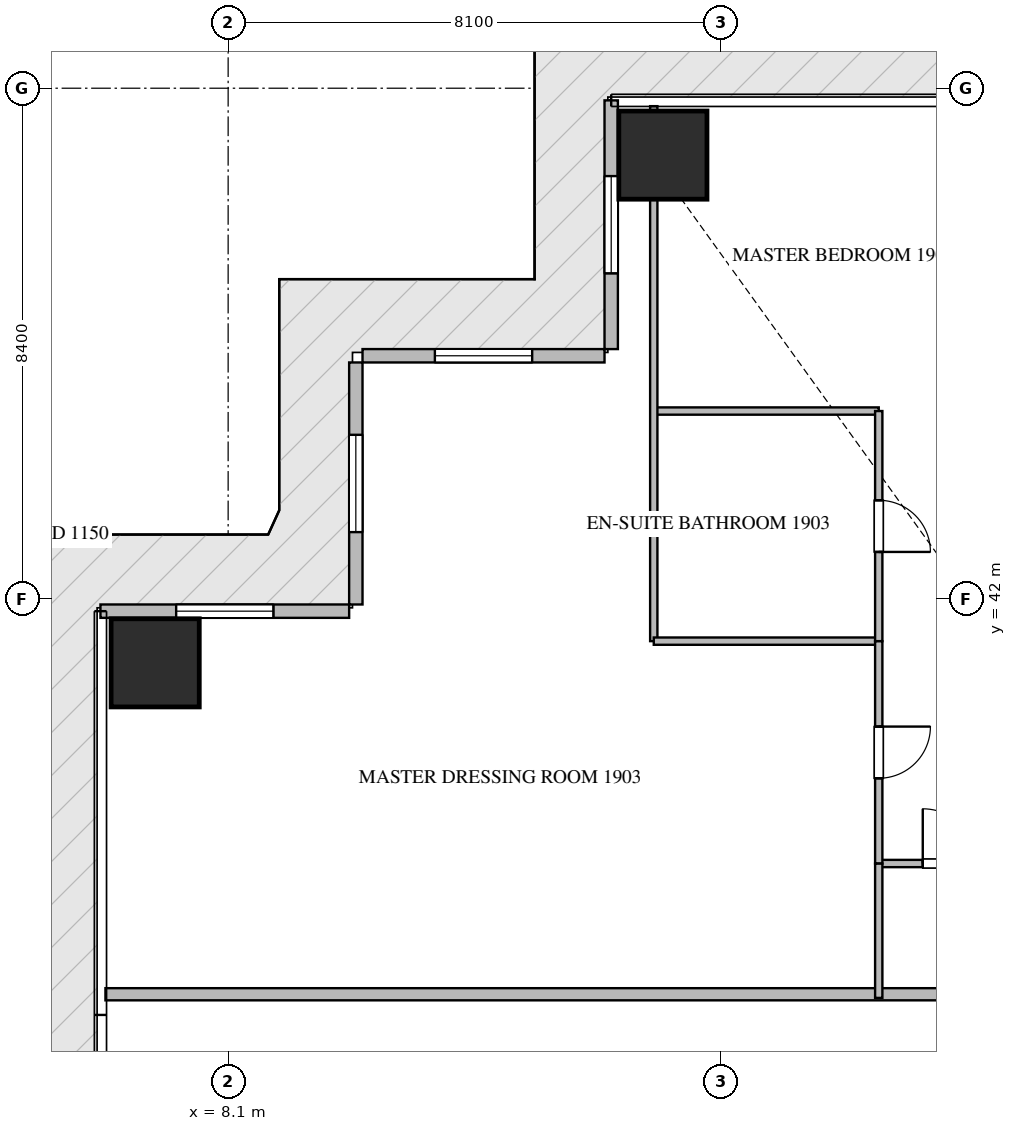
"""IFC4 building model, lengths in metres.
Left out: names, types, materials, properties, quantities, classifications, styles, units other than length and angle.
Written with IfcOpenShell. Run it as: python <this file> out.ifc"""

import sys

from ifc_helpers import new_model, si_unit, direction, frame, frame_2d, origin, origin_2d, place, context, subcontext, project, spatial, rectangle, extrude, source, transform, mapped, element, fill, save


model = new_model("IFC4")
c1 = context("Model", 3, precision=1e-05, world=origin(), true_north=direction((0.0, 1.0)))
c2 = subcontext(c1, "Body", "Model", "MODEL_VIEW")
j1 = project(units=[si_unit("LENGTHUNIT", "METRE"), si_unit("PLANEANGLEUNIT", "RADIAN")], contexts=[c1])
p1 = place(None, origin())
s1 = spatial("IfcSite", under=j1, at=p1, CompositionType="ELEMENT")
p2 = place(p1, origin())
s2 = spatial("IfcBuilding", under=s1, at=p2, CompositionType="ELEMENT")
p3 = place(p2, frame((0.0, 0.0, 79.2)))
s3 = spatial("IfcBuildingStorey", under=s2, at=p3, CompositionType="ELEMENT", Elevation=79.2)
m1 = source(origin(), c2, "Body", "SweptSolid", [
    extrude(rectangle(XDim=1.45, YDim=1.45, at=origin_2d()), origin(), (0.0, 0.0, 1.0), 3.75),
])
for number, where, z_axis, x_axis in (
    (1, (15.25, 49.3, -0.26), (0.0, 0.0, 1.0), (1.0, 0.0, 0.0)),
    (2, (6.9, 40.95, -0.26), (0.0, 0.0, 1.0), (1.0, 0.0, 0.0)),
):
    element("IfcColumn", number, at=place(p3, frame(where, z_axis=z_axis, x_axis=x_axis)), inside=s3, PredefinedType="COLUMN", context=c2, shape_type="MappedRepresentation", body=[
        mapped(m1, transform((0.0, 0.0, 0.0), scale=1.0)),
    ])
p4 = place(p3, frame((14.4, 50.2, 0.0), z_axis=(0.0, 0.0, 1.0), x_axis=(0.0, -1.0, 0.0)))
e3 = element("IfcWall", 3, at=p4, inside=s3, PredefinedType="ELEMENTEDWALL", context=c2, shape_type="SweptSolid", body=[
    extrude(rectangle(XDim=4.09, YDim=0.22, at=frame_2d((2.045, 0.0))), origin(), (0.0, 0.0, 1.0), 3.475),
])
p5 = place(p4, frame((1.245, 0.0, 0.65)))
e4 = element("IfcOpeningElement", 4, at=p5, cuts=e3, PredefinedType="OPENING", context=c2, shape_type="SweptSolid", body=[
    extrude(rectangle(XDim=1.6, YDim=2.1, at=frame_2d((0.8, 1.05))), frame((0.0, 0.12, 0.0), z_axis=(0.0, -1.0, 0.0), x_axis=(1.0, 0.0, 0.0)), (0.0, 0.0, 1.0), 0.24),
])
p6 = place(p3, frame((14.29, 46.0, 0.0), z_axis=(0.0, 0.0, 1.0), x_axis=(-1.0, 0.0, 0.0)))
e5 = element("IfcWall", 5, at=p6, inside=s3, PredefinedType="ELEMENTEDWALL", context=c2, shape_type="SweptSolid", body=[
    extrude(rectangle(XDim=3.98, YDim=0.22, at=frame_2d((1.99, 0.0))), origin(), (0.0, 0.0, 1.0), 3.475),
])
p7 = place(p6, frame((1.19, 0.0, 0.65)))
e6 = element("IfcOpeningElement", 6, at=p7, cuts=e5, PredefinedType="OPENING", context=c2, shape_type="SweptSolid", body=[
    extrude(rectangle(XDim=1.6, YDim=2.1, at=frame_2d((0.8, 1.05))), frame((0.0, 0.12, 0.0), z_axis=(0.0, -1.0, 0.0), x_axis=(1.0, 0.0, 0.0)), (0.0, 0.0, 1.0), 0.24),
])
p8 = place(p3, frame((10.2, 45.89, 0.0), z_axis=(0.0, 0.0, 1.0), x_axis=(0.0, -1.0, 0.0)))
e7 = element("IfcWall", 7, at=p8, inside=s3, PredefinedType="ELEMENTEDWALL", context=c2, shape_type="SweptSolid", body=[
    extrude(rectangle(XDim=3.98, YDim=0.22, at=frame_2d((1.99, 0.0))), origin(), (0.0, 0.0, 1.0), 3.475),
])
p9 = place(p8, frame((1.19, 0.0, 0.65)))
e8 = element("IfcOpeningElement", 8, at=p9, cuts=e7, PredefinedType="OPENING", context=c2, shape_type="SweptSolid", body=[
    extrude(rectangle(XDim=1.6, YDim=2.1, at=frame_2d((0.8, 1.05))), frame((0.0, 0.12, 0.0), z_axis=(0.0, -1.0, 0.0), x_axis=(1.0, 0.0, 0.0)), (0.0, 0.0, 1.0), 0.24),
])
p10 = place(p3, frame((10.09, 41.8, 0.0), z_axis=(0.0, 0.0, 1.0), x_axis=(-1.0, 0.0, 0.0)))
e9 = element("IfcWall", 9, at=p10, inside=s3, PredefinedType="ELEMENTEDWALL", context=c2, shape_type="SweptSolid", body=[
    extrude(rectangle(XDim=4.09, YDim=0.22, at=frame_2d((2.045, 0.0))), origin(), (0.0, 0.0, 1.0), 3.475),
])
p11 = place(p10, frame((1.245, 0.0, 0.65)))
e10 = element("IfcOpeningElement", 10, at=p11, cuts=e9, PredefinedType="OPENING", context=c2, shape_type="SweptSolid", body=[
    extrude(rectangle(XDim=1.6, YDim=2.1, at=frame_2d((0.8, 1.05))), frame((0.0, 0.12, 0.0), z_axis=(0.0, -1.0, 0.0), x_axis=(1.0, 0.0, 0.0)), (0.0, 0.0, 1.0), 0.24),
])
p12 = place(p3, frame((6.082, 35.5, 0.0), z_axis=(0.0, 0.0, 1.0), x_axis=(1.0, 0.0, 0.0)))
e11 = element("IfcWall", 11, at=p12, inside=s3, PredefinedType="PARTITIONING", context=c2, shape_type="SweptSolid", body=[
    extrude(rectangle(XDim=15.318, YDim=0.2, at=frame_2d((7.659, 0.0))), origin(), (0.0, 0.0, 1.0), 3.49),
])
p13 = place(p3, frame((18.8, 37.65, 0.0), z_axis=(0.0, 0.0, 1.0), x_axis=(1.0, 0.0, 0.0)))
e12 = element("IfcWall", 12, at=p13, inside=s3, PredefinedType="PARTITIONING", context=c2, shape_type="SweptSolid", body=[
    extrude(rectangle(XDim=2.348, YDim=0.12, at=frame_2d((1.174, 0.0))), origin(), (0.0, 0.0, 1.0), 3.49),
])
p14 = place(p13, frame((0.724, 0.0, 0.0)))
e13 = element("IfcOpeningElement", 13, at=p14, cuts=e12, PredefinedType="OPENING", context=c2, shape_type="SweptSolid", body=[
    extrude(rectangle(XDim=0.9, YDim=2.1, at=frame_2d((0.45, 1.05))), frame((0.0, 0.07, 0.0), z_axis=(0.0, -1.0, 0.0), x_axis=(1.0, 0.0, 0.0)), (0.0, 0.0, 1.0), 0.14),
])
p15 = place(p3, frame((15.1, 45.091, 0.0), z_axis=(0.0, 0.0, 1.0), x_axis=(1.0, 0.0, 0.0)))
e14 = element("IfcWall", 14, at=p15, inside=s3, PredefinedType="PARTITIONING", context=c2, shape_type="SweptSolid", body=[
    extrude(rectangle(XDim=3.7, YDim=0.12, at=frame_2d((1.85, 0.0))), origin(), (0.0, 0.0, 1.0), 3.49),
])
p16 = place(p3, frame((15.1, 50.105, 0.0), z_axis=(0.0, 0.0, 1.0), x_axis=(0.0, -1.0, 0.0)))
e15 = element("IfcWall", 15, at=p16, inside=s3, PredefinedType="PARTITIONING", context=c2, shape_type="SweptSolid", body=[
    extrude(rectangle(XDim=8.798, YDim=0.12, at=frame_2d((4.399, 0.0))), origin(), (0.0, 0.0, 1.0), 2.922),
])
p17 = place(p3, frame((15.1, 41.307, 0.0), z_axis=(0.0, 0.0, 1.0), x_axis=(1.0, 0.0, 0.0)))
e16 = element("IfcWall", 16, at=p17, inside=s3, PredefinedType="PARTITIONING", context=c2, shape_type="SweptSolid", body=[
    extrude(rectangle(XDim=3.7, YDim=0.12, at=frame_2d((1.85, 0.0))), origin(), (0.0, 0.0, 1.0), 3.49),
])
p18 = place(p3, frame((18.8, 45.091, 0.0), z_axis=(0.0, 0.0, 1.0), x_axis=(0.0, -1.0, 0.0)))
e17 = element("IfcWall", 17, at=p18, inside=s3, PredefinedType="PARTITIONING", context=c2, shape_type="SweptSolid", body=[
    extrude(rectangle(XDim=3.784, YDim=0.12, at=frame_2d((1.892, 0.0))), origin(), (0.0, 0.0, 1.0), 3.49),
])
p19 = place(p18, frame((1.467, 0.0, 0.0)))
e18 = element("IfcOpeningElement", 18, at=p19, cuts=e17, PredefinedType="OPENING", context=c2, shape_type="SweptSolid", body=[
    extrude(rectangle(XDim=0.85, YDim=2.1, at=frame_2d((0.425, 1.05))), frame((0.0, 0.07, 0.0), z_axis=(0.0, -1.0, 0.0), x_axis=(1.0, 0.0, 0.0)), (0.0, 0.0, 1.0), 0.14),
])
p20 = place(p3, frame((18.8, 41.305, 0.0), z_axis=(0.0, 0.0, 1.0), x_axis=(0.0, -1.0, 0.0)))
e19 = element("IfcWall", 19, at=p20, inside=s3, PredefinedType="PARTITIONING", context=c2, shape_type="SweptSolid", body=[
    extrude(rectangle(XDim=3.655, YDim=0.12, at=frame_2d((1.828, 0.0))), origin(), (0.0, 0.0, 1.0), 3.49),
])
p21 = place(p20, frame((1.403, 0.0, 0.0)))
e20 = element("IfcOpeningElement", 20, at=p21, cuts=e19, PredefinedType="OPENING", context=c2, shape_type="SweptSolid", body=[
    extrude(rectangle(XDim=0.85, YDim=2.1, at=frame_2d((0.425, 1.05))), frame((0.0, 0.07, 0.0), z_axis=(0.0, -1.0, 0.0), x_axis=(1.0, 0.0, 0.0)), (0.0, 0.0, 1.0), 0.14),
])
p22 = place(p3, frame((18.8, 37.648, 0.0), z_axis=(0.0, 0.0, 1.0), x_axis=(0.0, -1.0, 0.0)))
e21 = element("IfcWall", 21, at=p22, inside=s3, PredefinedType="PARTITIONING", context=c2, shape_type="SweptSolid", body=[
    extrude(rectangle(XDim=2.208, YDim=0.12, at=frame_2d((1.104, 0.0))), origin(), (0.0, 0.0, 1.0), 3.49),
])
m2 = source(origin(), c2, "Body", "SweptSolid", [
    extrude(rectangle(XDim=1.6, YDim=2.1, at=frame_2d((0.8, 1.05))), frame((0.0, 0.03, 0.0), z_axis=(0.0, -1.0, 0.0), x_axis=(1.0, 0.0, 0.0)), (0.0, 0.0, 1.0), 0.06),
])
p23 = place(p5, origin())
e22 = element("IfcWindow", 22, at=p23, inside=s3, PartitioningType="SINGLE_PANEL", PredefinedType="WINDOW", context=c2, shape_type="MappedRepresentation", body=[
    mapped(m2, transform((0.0, 0.0, 0.0), scale=1.0)),
])
fill(e4, e22)
p24 = place(p7, origin())
e23 = element("IfcWindow", 23, at=p24, inside=s3, PartitioningType="SINGLE_PANEL", PredefinedType="WINDOW", context=c2, shape_type="MappedRepresentation", body=[
    mapped(m2, transform((0.0, 0.0, 0.0), scale=1.0)),
])
fill(e6, e23)
p25 = place(p9, origin())
e24 = element("IfcWindow", 24, at=p25, inside=s3, PartitioningType="SINGLE_PANEL", PredefinedType="WINDOW", context=c2, shape_type="MappedRepresentation", body=[
    mapped(m2, transform((0.0, 0.0, 0.0), scale=1.0)),
])
fill(e8, e24)
p26 = place(p11, origin())
e25 = element("IfcWindow", 25, at=p26, inside=s3, PartitioningType="SINGLE_PANEL", PredefinedType="WINDOW", context=c2, shape_type="MappedRepresentation", body=[
    mapped(m2, transform((0.0, 0.0, 0.0), scale=1.0)),
])
fill(e10, e25)
m3 = source(origin(), c2, "Body", "SweptSolid", [
    extrude(rectangle(XDim=0.9, YDim=2.1, at=frame_2d((0.45, 1.05))), frame((0.0, 0.025, 0.0), z_axis=(0.0, -1.0, 0.0), x_axis=(1.0, 0.0, 0.0)), (0.0, 0.0, 1.0), 0.05),
])
p27 = place(p14, origin())
e26 = element("IfcDoor", 26, at=p27, inside=s3, OperationType="SINGLE_SWING_LEFT", PredefinedType="DOOR", context=c2, shape_type="MappedRepresentation", body=[
    mapped(m3, transform((0.0, 0.0, 0.0), scale=1.0)),
])
fill(e13, e26)
m4 = source(origin(), c2, "Body", "SweptSolid", [
    extrude(rectangle(XDim=0.85, YDim=2.1, at=frame_2d((0.425, 1.05))), frame((0.0, 0.025, 0.0), z_axis=(0.0, -1.0, 0.0), x_axis=(1.0, 0.0, 0.0)), (0.0, 0.0, 1.0), 0.05),
])
p28 = place(p19, origin())
e27 = element("IfcDoor", 27, at=p28, inside=s3, OperationType="SINGLE_SWING_RIGHT", PredefinedType="DOOR", context=c2, shape_type="MappedRepresentation", body=[
    mapped(m4, transform((0.0, 0.0, 0.0), scale=1.0)),
])
fill(e18, e27)
p29 = place(p21, origin())
e28 = element("IfcDoor", 28, at=p29, inside=s3, OperationType="SINGLE_SWING_LEFT", PredefinedType="DOOR", context=c2, shape_type="MappedRepresentation", body=[
    mapped(m4, transform((0.0, 0.0, 0.0), scale=1.0)),
])
fill(e20, e28)
save(model, sys.argv[1])
